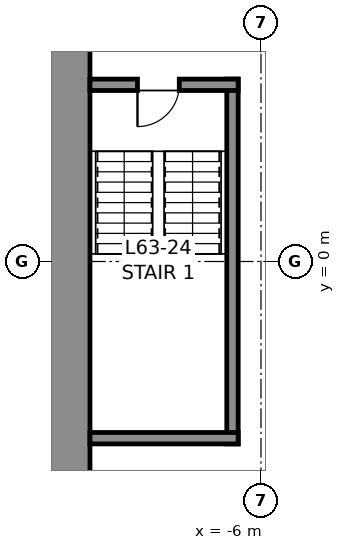
"""IFC4 building model, lengths in metres.
Left out: names, types, materials, properties, quantities, classifications, styles, units other than length and angle.
Written with IfcOpenShell. Run it as: python <this file> out.ifc"""

import sys

from ifc_helpers import new_model, si_unit, direction, frame, frame_2d, origin, place, context, subcontext, project, spatial, rectangle, extrude, element, fill, save


model = new_model("IFC4")
c1 = context("Model", 3, precision=1e-05, world=origin(), true_north=direction((0.0, 1.0)))
c2 = subcontext(c1, "Body", "Model", "MODEL_VIEW")
j1 = project(units=[si_unit("LENGTHUNIT", "METRE"), si_unit("PLANEANGLEUNIT", "RADIAN")], contexts=[c1])
p1 = place(None, origin())
s1 = spatial("IfcSite", under=j1, at=p1, CompositionType="ELEMENT")
p2 = place(p1, origin())
s2 = spatial("IfcBuilding", under=s1, at=p2, CompositionType="ELEMENT")
p3 = place(p2, frame((0.0, 0.0, 281.8)))
s3 = spatial("IfcBuildingStorey", under=s2, at=p3, CompositionType="ELEMENT", Elevation=281.8)
p4 = place(p3, frame((-11.25, -10.5, 0.0), z_axis=(0.0, 0.0, 1.0), x_axis=(0.0, 1.0, 0.0)))
e1 = element("IfcWall", 1, at=p4, inside=s3, PredefinedType="SHEAR", context=c2, shape_type="SweptSolid", body=[
    extrude(rectangle(XDim=21.0, YDim=1.5, at=frame_2d((10.5, 0.0))), origin(), (0.0, 0.0, 1.0), 4.0),
])
p5 = place(p4, frame((16.1, 0.0, 0.0)))
e2 = element("IfcOpeningElement", 2, at=p5, cuts=e1, PredefinedType="OPENING", context=c2, shape_type="SweptSolid", body=[
    extrude(rectangle(XDim=1.2, YDim=2.3, at=frame_2d((0.6, 1.15))), frame((0.0, 0.76, 0.0), z_axis=(0.0, -1.0, 0.0), x_axis=(1.0, 0.0, 0.0)), (0.0, 0.0, 1.0), 1.52),
])
p6 = place(p4, frame((3.7, 0.0, 0.0)))
e3 = element("IfcOpeningElement", 3, at=p6, cuts=e1, PredefinedType="OPENING", context=c2, shape_type="SweptSolid", body=[
    extrude(rectangle(XDim=1.2, YDim=2.3, at=frame_2d((0.6, 1.15))), frame((0.0, 0.76, 0.0), z_axis=(0.0, -1.0, 0.0), x_axis=(1.0, 0.0, 0.0)), (0.0, 0.0, 1.0), 1.52),
])
p7 = place(p3, frame((-6.75, -4.8, 0.0), z_axis=(0.0, 0.0, 1.0), x_axis=(0.0, 1.0, 0.0)))
e4 = element("IfcWall", 4, at=p7, inside=s3, PredefinedType="SOLIDWALL", context=c2, shape_type="SweptSolid", body=[
    extrude(rectangle(XDim=9.6, YDim=0.3, at=frame_2d((4.8, 0.0))), origin(), (0.0, 0.0, 1.0), 3.75),
])
p8 = place(p3, frame((-10.5, 4.65, 0.0), z_axis=(0.0, 0.0, 1.0), x_axis=(1.0, 0.0, 0.0)))
e5 = element("IfcWall", 5, at=p8, inside=s3, PredefinedType="SOLIDWALL", context=c2, shape_type="SweptSolid", body=[
    extrude(rectangle(XDim=3.9, YDim=0.3, at=frame_2d((1.95, 0.0))), origin(), (0.0, 0.0, 1.0), 3.75),
])
p9 = place(p8, frame((1.25, 0.0, 0.0)))
e6 = element("IfcOpeningElement", 6, at=p9, cuts=e5, PredefinedType="OPENING", context=c2, shape_type="SweptSolid", body=[
    extrude(rectangle(XDim=1.1, YDim=2.3, at=frame_2d((0.55, 1.15))), frame((0.0, 0.16, 0.0), z_axis=(0.0, -1.0, 0.0), x_axis=(1.0, 0.0, 0.0)), (0.0, 0.0, 1.0), 0.32),
])
p10 = place(p3, frame((-6.6, -4.65, 0.0), z_axis=(0.0, 0.0, 1.0), x_axis=(-1.0, 0.0, 0.0)))
e7 = element("IfcWall", 7, at=p10, inside=s3, PredefinedType="SOLIDWALL", context=c2, shape_type="SweptSolid", body=[
    extrude(rectangle(XDim=3.9, YDim=0.3, at=frame_2d((1.95, 0.0))), origin(), (0.0, 0.0, 1.0), 3.75),
])
p11 = place(p9, frame((1.1, 0.0, 0.0), z_axis=(0.0, 0.0, 1.0), x_axis=(-1.0, 0.0, 0.0)))
e8 = element("IfcDoor", 8, at=p11, inside=s3, OperationType="SINGLE_SWING_RIGHT", PredefinedType="DOOR", context=c2, shape_type="SweptSolid", body=[
    extrude(rectangle(XDim=1.1, YDim=2.3, at=frame_2d((0.55, 1.15))), frame((0.0, 0.025, 0.0), z_axis=(0.0, -1.0, 0.0), x_axis=(1.0, 0.0, 0.0)), (0.0, 0.0, 1.0), 0.05),
])
fill(e6, e8)
save(model, sys.argv[1])
